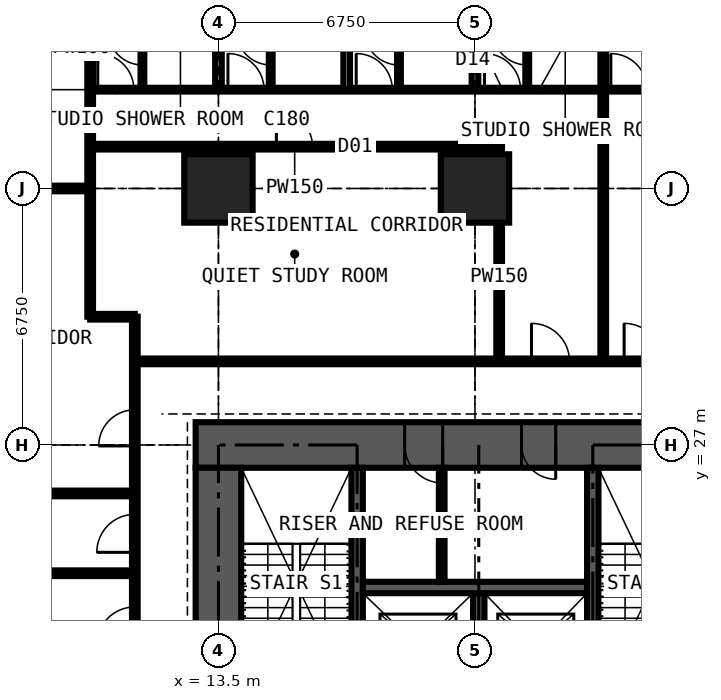
"""IFC4 building model, lengths in metres.
Left out: names, types, materials, properties, quantities, classifications, styles, units other than length and angle.
Written with IfcOpenShell. Run it as: python <this file> out.ifc"""

import sys

from ifc_helpers import new_model, si_unit, direction, frame, frame_2d, origin, origin_2d, place, context, subcontext, project, spatial, rectangle, extrude, element, fill, save


model = new_model("IFC4")
c1 = context("Model", 3, precision=1e-05, world=origin(), true_north=direction((0.0, 1.0)))
c2 = subcontext(c1, "Body", "Model", "MODEL_VIEW")
j1 = project(units=[si_unit("LENGTHUNIT", "METRE"), si_unit("PLANEANGLEUNIT", "RADIAN")], contexts=[c1])
p1 = place(None, origin())
s1 = spatial("IfcSite", under=j1, at=p1, CompositionType="ELEMENT")
p2 = place(p1, origin())
s2 = spatial("IfcBuilding", under=s1, at=p2, CompositionType="ELEMENT")
p3 = place(p2, frame((0.0, 0.0, 57.6)))
s3 = spatial("IfcBuildingStorey", under=s2, at=p3, CompositionType="ELEMENT", Elevation=57.6)
for number, where, z_axis, x_axis in (
    (1, (13.5, 33.75, 0.0), (0.0, 0.0, 1.0), (1.0, 0.0, 0.0)),
    (2, (20.25, 33.75, 0.0), (0.0, 0.0, 1.0), (1.0, 0.0, 0.0)),
):
    element("IfcColumn", number, at=place(p3, frame(where, z_axis=z_axis, x_axis=x_axis)), inside=s3, PredefinedType="COLUMN", context=c2, shape_type="SweptSolid", body=[
        extrude(rectangle(XDim=1.8, YDim=1.8, at=origin_2d()), origin(), (0.0, 0.0, 1.0), 3.6),
    ])
p4 = place(p3, frame((27.6, 27.0, 0.0), z_axis=(0.0, 0.0, 1.0), x_axis=(-1.0, 0.0, 0.0)))
e3 = element("IfcWall", 3, at=p4, inside=s3, PredefinedType="SHEAR", context=c2, shape_type="SweptSolid", body=[
    extrude(rectangle(XDim=14.7, YDim=1.2, at=frame_2d((7.35, 0.0))), origin(), (0.0, 0.0, 1.0), 3.6),
])
p5 = place(p4, frame((5.225, 0.0, 0.0)))
e4 = element("IfcOpeningElement", 4, at=p5, cuts=e3, PredefinedType="OPENING", context=c2, shape_type="SweptSolid", body=[
    extrude(rectangle(XDim=0.9, YDim=2.2, at=frame_2d((0.45, 1.1))), frame((0.0, 0.61, 0.0), z_axis=(0.0, -1.0, 0.0), x_axis=(1.0, 0.0, 0.0)), (0.0, 0.0, 1.0), 1.22),
])
p6 = place(p4, frame((8.2, 0.0, 0.0)))
e5 = element("IfcOpeningElement", 5, at=p6, cuts=e3, PredefinedType="OPENING", context=c2, shape_type="SweptSolid", body=[
    extrude(rectangle(XDim=1.0, YDim=2.2, at=frame_2d((0.5, 1.1))), frame((0.0, 0.61, 0.0), z_axis=(0.0, -1.0, 0.0), x_axis=(1.0, 0.0, 0.0)), (0.0, 0.0, 1.0), 1.22),
])
p7 = place(p3, frame((13.5, 26.4, 0.0), z_axis=(0.0, 0.0, 1.0), x_axis=(0.0, -1.0, 0.0)))
e6 = element("IfcWall", 6, at=p7, inside=s3, PredefinedType="SHEAR", context=c2, shape_type="SweptSolid", body=[
    extrude(rectangle(XDim=12.3, YDim=1.2, at=frame_2d((6.15, 0.0))), origin(), (0.0, 0.0, 1.0), 3.6),
])
p8 = place(p7, frame((7.45, 0.0, 0.0)))
e7 = element("IfcOpeningElement", 7, at=p8, cuts=e6, PredefinedType="OPENING", context=c2, shape_type="SweptSolid", body=[
    extrude(rectangle(XDim=1.2, YDim=2.2, at=frame_2d((0.6, 1.1))), frame((0.0, 0.61, 0.0), z_axis=(0.0, -1.0, 0.0), x_axis=(1.0, 0.0, 0.0)), (0.0, 0.0, 1.0), 1.22),
])
for number, where, z_axis, x_axis in (
    (8, (17.15, 20.3, 0.0), (0.0, 0.0, 1.0), (0.0, 1.0, 0.0)),
    (9, (23.35, 20.3, 0.0), (0.0, 0.0, 1.0), (0.0, 1.0, 0.0)),
):
    element("IfcWall", number, at=place(p3, frame(where, z_axis=z_axis, x_axis=x_axis)), inside=s3, PredefinedType="SHEAR", context=c2, shape_type="SweptSolid", body=[
        extrude(rectangle(XDim=6.1, YDim=0.3, at=frame_2d((3.05, 0.0))), origin(), (0.0, 0.0, 1.0), 3.6),
    ])
p9 = place(p3, frame((20.35, 20.3, 0.0), z_axis=(0.0, 0.0, 1.0), x_axis=(0.0, 1.0, 0.0)))
e10 = element("IfcWall", 10, at=p9, inside=s3, PredefinedType="SHEAR", context=c2, shape_type="SweptSolid", body=[
    extrude(rectangle(XDim=2.8, YDim=0.3, at=frame_2d((1.4, 0.0))), origin(), (0.0, 0.0, 1.0), 3.6),
])
p10 = place(p3, frame((17.3, 23.25, 0.0), z_axis=(0.0, 0.0, 1.0), x_axis=(1.0, 0.0, 0.0)))
e11 = element("IfcWall", 11, at=p10, inside=s3, PredefinedType="SHEAR", context=c2, shape_type="SweptSolid", body=[
    extrude(rectangle(XDim=5.9, YDim=0.3, at=frame_2d((2.95, 0.0))), origin(), (0.0, 0.0, 1.0), 3.6),
])
p11 = place(p3, frame((19.375, 23.4, 0.0), z_axis=(0.0, 0.0, 1.0), x_axis=(0.0, 1.0, 0.0)))
e12 = element("IfcWall", 12, at=p11, inside=s3, PredefinedType="PARTITIONING", context=c2, shape_type="SweptSolid", body=[
    extrude(rectangle(XDim=3.0, YDim=0.15, at=frame_2d((1.5, 0.0))), origin(), (0.0, 0.0, 1.0), 3.375),
])
p12 = place(p3, frame((-0.734, 23.625, 0.0), z_axis=(0.0, 0.0, 1.0), x_axis=(1.0, 0.0, 0.0)))
e13 = element("IfcWall", 13, at=p12, inside=s3, PredefinedType="PARTITIONING", context=c2, shape_type="SweptSolid", body=[
    extrude(rectangle(XDim=12.034, YDim=0.15, at=frame_2d((6.017, 0.0))), origin(), (0.0, 0.0, 1.0), 3.375),
])
p13 = place(p3, frame((4.15, 33.75, 0.0), z_axis=(0.0, 0.0, 1.0), x_axis=(1.0, 0.0, 0.0)))
e14 = element("IfcWall", 14, at=p13, inside=s3, PredefinedType="PARTITIONING", context=c2, shape_type="SweptSolid", body=[
    extrude(rectangle(XDim=5.975, YDim=0.15, at=frame_2d((2.988, 0.0))), origin(), (0.0, 0.0, 1.0), 2.877),
])
p14 = place(p3, frame((5.65, 25.725, 0.0), z_axis=(0.0, 0.0, 1.0), x_axis=(1.0, 0.0, 0.0)))
e15 = element("IfcWall", 15, at=p14, inside=s3, PredefinedType="PARTITIONING", context=c2, shape_type="SweptSolid", body=[
    extrude(rectangle(XDim=5.65, YDim=0.15, at=frame_2d((2.825, 0.0))), origin(), (0.0, 0.0, 1.0), 3.375),
])
p15 = place(p3, frame((10.125, 30.375, 0.0), z_axis=(0.0, 0.0, 1.0), x_axis=(0.0, 1.0, 0.0)))
e16 = element("IfcWall", 16, at=p15, inside=s3, PredefinedType="PARTITIONING", context=c2, shape_type="SweptSolid", body=[
    extrude(rectangle(XDim=10.859, YDim=0.15, at=frame_2d((5.429, 0.0))), origin(), (0.0, 0.0, 1.0), 3.375),
])
p16 = place(p3, frame((10.125, 30.375, 0.0), z_axis=(0.0, 0.0, 1.0), x_axis=(1.0, 0.0, 0.0)))
e17 = element("IfcWall", 17, at=p16, inside=s3, PredefinedType="PARTITIONING", context=c2, shape_type="SweptSolid", body=[
    extrude(rectangle(XDim=1.175, YDim=0.15, at=frame_2d((0.587, 0.0))), origin(), (0.0, 0.0, 1.0), 3.375),
])
p17 = place(p3, frame((10.125, 34.85, 0.0), z_axis=(0.0, 0.0, 1.0), x_axis=(1.0, 0.0, 0.0)))
e18 = element("IfcWall", 18, at=p17, inside=s3, PredefinedType="PARTITIONING", context=c2, shape_type="SweptSolid", body=[
    extrude(rectangle(XDim=10.762, YDim=0.15, at=frame_2d((5.381, 0.0))), origin(), (0.0, 0.0, 1.0), 3.375),
])
p18 = place(p17, frame((4.9, 0.0, 0.0)))
e19 = element("IfcOpeningElement", 19, at=p18, cuts=e18, PredefinedType="OPENING", context=c2, shape_type="SweptSolid", body=[
    extrude(rectangle(XDim=0.95, YDim=2.2, at=frame_2d((0.475, 1.1))), frame((0.0, 0.085, 0.0), z_axis=(0.0, -1.0, 0.0), x_axis=(1.0, 0.0, 0.0)), (0.0, 0.0, 1.0), 0.17),
])
p19 = place(p3, frame((10.125, 36.35, 0.0), z_axis=(0.0, 0.0, 1.0), x_axis=(1.0, 0.0, 0.0)))
e20 = element("IfcWall", 20, at=p19, inside=s3, PredefinedType="PARTITIONING", context=c2, shape_type="SweptSolid", body=[
    extrude(rectangle(XDim=23.625, YDim=0.1, at=frame_2d((11.812, 0.0))), origin(), (0.0, 0.0, 1.0), 3.375),
])
p20 = place(p19, frame((20.5, 0.0, 0.0)))
e21 = element("IfcOpeningElement", 21, at=p20, cuts=e20, PredefinedType="OPENING", context=c2, shape_type="SweptSolid", body=[
    extrude(rectangle(XDim=0.95, YDim=2.2, at=frame_2d((0.475, 1.1))), frame((0.0, 0.06, 0.0), z_axis=(0.0, -1.0, 0.0), x_axis=(1.0, 0.0, 0.0)), (0.0, 0.0, 1.0), 0.12),
])
p21 = place(p19, frame((17.125, 0.0, 0.0)))
e22 = element("IfcOpeningElement", 22, at=p21, cuts=e20, PredefinedType="OPENING", context=c2, shape_type="SweptSolid", body=[
    extrude(rectangle(XDim=0.95, YDim=2.2, at=frame_2d((0.475, 1.1))), frame((0.0, 0.06, 0.0), z_axis=(0.0, -1.0, 0.0), x_axis=(1.0, 0.0, 0.0)), (0.0, 0.0, 1.0), 0.12),
])
p22 = place(p19, frame((13.7, 0.0, 0.0)))
e23 = element("IfcOpeningElement", 23, at=p22, cuts=e20, PredefinedType="OPENING", context=c2, shape_type="SweptSolid", body=[
    extrude(rectangle(XDim=0.95, YDim=2.2, at=frame_2d((0.475, 1.1))), frame((0.0, 0.06, 0.0), z_axis=(0.0, -1.0, 0.0), x_axis=(1.0, 0.0, 0.0)), (0.0, 0.0, 1.0), 0.12),
])
p23 = place(p19, frame((0.2, 0.0, 0.0)))
e24 = element("IfcOpeningElement", 24, at=p23, cuts=e20, PredefinedType="OPENING", context=c2, shape_type="SweptSolid", body=[
    extrude(rectangle(XDim=0.95, YDim=2.2, at=frame_2d((0.475, 1.1))), frame((0.0, 0.06, 0.0), z_axis=(0.0, -1.0, 0.0), x_axis=(1.0, 0.0, 0.0)), (0.0, 0.0, 1.0), 0.12),
])
p24 = place(p19, frame((3.625, 0.0, 0.0)))
e25 = element("IfcOpeningElement", 25, at=p24, cuts=e20, PredefinedType="OPENING", context=c2, shape_type="SweptSolid", body=[
    extrude(rectangle(XDim=0.95, YDim=2.2, at=frame_2d((0.475, 1.1))), frame((0.0, 0.06, 0.0), z_axis=(0.0, -1.0, 0.0), x_axis=(1.0, 0.0, 0.0)), (0.0, 0.0, 1.0), 0.12),
])
p25 = place(p19, frame((7.0, 0.0, 0.0)))
e26 = element("IfcOpeningElement", 26, at=p25, cuts=e20, PredefinedType="OPENING", context=c2, shape_type="SweptSolid", body=[
    extrude(rectangle(XDim=0.95, YDim=2.2, at=frame_2d((0.475, 1.1))), frame((0.0, 0.06, 0.0), z_axis=(0.0, -1.0, 0.0), x_axis=(1.0, 0.0, 0.0)), (0.0, 0.0, 1.0), 0.12),
])
p26 = place(p19, frame((10.375, 0.0, 0.0)))
e27 = element("IfcOpeningElement", 27, at=p26, cuts=e20, PredefinedType="OPENING", context=c2, shape_type="SweptSolid", body=[
    extrude(rectangle(XDim=0.95, YDim=2.2, at=frame_2d((0.475, 1.1))), frame((0.0, 0.06, 0.0), z_axis=(0.0, -1.0, 0.0), x_axis=(1.0, 0.0, 0.0)), (0.0, 0.0, 1.0), 0.12),
])
p27 = place(p3, frame((11.3, 11.3, 0.0), z_axis=(0.0, 0.0, 1.0), x_axis=(0.0, 1.0, 0.0)))
e28 = element("IfcWall", 28, at=p27, inside=s3, PredefinedType="PARTITIONING", context=c2, shape_type="SweptSolid", body=[
    extrude(rectangle(XDim=19.075, YDim=0.15, at=frame_2d((9.538, 0.0))), origin(), (0.0, 0.0, 1.0), 3.375),
])
p28 = place(p27, frame((12.875, 0.0, 0.0)))
e29 = element("IfcOpeningElement", 29, at=p28, cuts=e28, PredefinedType="OPENING", context=c2, shape_type="SweptSolid", body=[
    extrude(rectangle(XDim=1.0, YDim=2.2, at=frame_2d((0.5, 1.1))), frame((0.0, 0.085, 0.0), z_axis=(0.0, -1.0, 0.0), x_axis=(1.0, 0.0, 0.0)), (0.0, 0.0, 1.0), 0.17),
])
p29 = place(p27, frame((10.438, 0.0, 0.0)))
e30 = element("IfcOpeningElement", 30, at=p29, cuts=e28, PredefinedType="OPENING", context=c2, shape_type="SweptSolid", body=[
    extrude(rectangle(XDim=1.0, YDim=2.2, at=frame_2d((0.5, 1.1))), frame((0.0, 0.085, 0.0), z_axis=(0.0, -1.0, 0.0), x_axis=(1.0, 0.0, 0.0)), (0.0, 0.0, 1.0), 0.17),
])
p30 = place(p27, frame((15.675, 0.0, 0.0)))
e31 = element("IfcOpeningElement", 31, at=p30, cuts=e28, PredefinedType="OPENING", context=c2, shape_type="SweptSolid", body=[
    extrude(rectangle(XDim=0.95, YDim=2.2, at=frame_2d((0.475, 1.1))), frame((0.0, 0.085, 0.0), z_axis=(0.0, -1.0, 0.0), x_axis=(1.0, 0.0, 0.0)), (0.0, 0.0, 1.0), 0.17),
])
p31 = place(p3, frame((11.3, 29.2, 0.0), z_axis=(0.0, 0.0, 1.0), x_axis=(1.0, 0.0, 0.0)))
e32 = element("IfcWall", 32, at=p31, inside=s3, PredefinedType="PARTITIONING", context=c2, shape_type="SweptSolid", body=[
    extrude(rectangle(XDim=19.075, YDim=0.15, at=frame_2d((9.538, 0.0))), origin(), (0.0, 0.0, 1.0), 3.375),
])
p32 = place(p31, frame((12.875, 0.0, 0.0)))
e33 = element("IfcOpeningElement", 33, at=p32, cuts=e32, PredefinedType="OPENING", context=c2, shape_type="SweptSolid", body=[
    extrude(rectangle(XDim=1.0, YDim=2.2, at=frame_2d((0.5, 1.1))), frame((0.0, 0.085, 0.0), z_axis=(0.0, -1.0, 0.0), x_axis=(1.0, 0.0, 0.0)), (0.0, 0.0, 1.0), 0.17),
])
p33 = place(p31, frame((10.438, 0.0, 0.0)))
e34 = element("IfcOpeningElement", 34, at=p33, cuts=e32, PredefinedType="OPENING", context=c2, shape_type="SweptSolid", body=[
    extrude(rectangle(XDim=1.0, YDim=2.2, at=frame_2d((0.5, 1.1))), frame((0.0, 0.085, 0.0), z_axis=(0.0, -1.0, 0.0), x_axis=(1.0, 0.0, 0.0)), (0.0, 0.0, 1.0), 0.17),
])
p34 = place(p31, frame((15.675, 0.0, 0.0)))
e35 = element("IfcOpeningElement", 35, at=p34, cuts=e32, PredefinedType="OPENING", context=c2, shape_type="SweptSolid", body=[
    extrude(rectangle(XDim=0.95, YDim=2.2, at=frame_2d((0.475, 1.1))), frame((0.0, 0.085, 0.0), z_axis=(0.0, -1.0, 0.0), x_axis=(1.0, 0.0, 0.0)), (0.0, 0.0, 1.0), 0.17),
])
p35 = place(p3, frame((11.5, 36.35, 0.0), z_axis=(0.0, 0.0, 1.0), x_axis=(0.0, 1.0, 0.0)))
e36 = element("IfcWall", 36, at=p35, inside=s3, PredefinedType="PARTITIONING", context=c2, shape_type="SweptSolid", body=[
    extrude(rectangle(XDim=2.2, YDim=0.1, at=frame_2d((1.1, 0.0))), origin(), (0.0, 0.0, 1.0), 3.375),
])
p36 = place(p35, frame((0.65, 0.0, 0.0)))
e37 = element("IfcOpeningElement", 37, at=p36, cuts=e36, PredefinedType="OPENING", context=c2, shape_type="SweptSolid", body=[
    extrude(rectangle(XDim=0.9, YDim=2.2, at=frame_2d((0.45, 1.1))), frame((0.0, 0.06, 0.0), z_axis=(0.0, -1.0, 0.0), x_axis=(1.0, 0.0, 0.0)), (0.0, 0.0, 1.0), 0.12),
])
p37 = place(p3, frame((13.5, 36.35, 0.0), z_axis=(0.0, 0.0, 1.0), x_axis=(0.0, 1.0, 0.0)))
e38 = element("IfcWall", 38, at=p37, inside=s3, PredefinedType="PARTITIONING", context=c2, shape_type="SweptSolid", body=[
    extrude(rectangle(XDim=4.884, YDim=0.175, at=frame_2d((2.442, 0.0))), origin(), (0.0, 0.0, 1.0), 2.61),
])
p38 = place(p3, frame((14.875, 36.35, 0.0), z_axis=(0.0, 0.0, 1.0), x_axis=(0.0, 1.0, 0.0)))
e39 = element("IfcWall", 39, at=p38, inside=s3, PredefinedType="PARTITIONING", context=c2, shape_type="SweptSolid", body=[
    extrude(rectangle(XDim=2.2, YDim=0.1, at=frame_2d((1.1, 0.0))), origin(), (0.0, 0.0, 1.0), 3.375),
])
p39 = place(p38, frame((0.65, 0.0, 0.0)))
e40 = element("IfcOpeningElement", 40, at=p39, cuts=e39, PredefinedType="OPENING", context=c2, shape_type="SweptSolid", body=[
    extrude(rectangle(XDim=0.9, YDim=2.2, at=frame_2d((0.45, 1.1))), frame((0.0, 0.06, 0.0), z_axis=(0.0, -1.0, 0.0), x_axis=(1.0, 0.0, 0.0)), (0.0, 0.0, 1.0), 0.12),
])
p40 = place(p3, frame((16.875, 36.35, 0.0), z_axis=(0.0, 0.0, 1.0), x_axis=(0.0, 1.0, 0.0)))
e41 = element("IfcWall", 41, at=p40, inside=s3, PredefinedType="PARTITIONING", context=c2, shape_type="SweptSolid", body=[
    extrude(rectangle(XDim=4.884, YDim=0.175, at=frame_2d((2.442, 0.0))), origin(), (0.0, 0.0, 1.0), 3.375),
])
p41 = place(p3, frame((18.25, 36.35, 0.0), z_axis=(0.0, 0.0, 1.0), x_axis=(0.0, 1.0, 0.0)))
e42 = element("IfcWall", 42, at=p41, inside=s3, PredefinedType="PARTITIONING", context=c2, shape_type="SweptSolid", body=[
    extrude(rectangle(XDim=2.2, YDim=0.1, at=frame_2d((1.1, 0.0))), origin(), (0.0, 0.0, 1.0), 3.375),
])
p42 = place(p41, frame((0.65, 0.0, 0.0)))
e43 = element("IfcOpeningElement", 43, at=p42, cuts=e42, PredefinedType="OPENING", context=c2, shape_type="SweptSolid", body=[
    extrude(rectangle(XDim=0.9, YDim=2.2, at=frame_2d((0.45, 1.1))), frame((0.0, 0.06, 0.0), z_axis=(0.0, -1.0, 0.0), x_axis=(1.0, 0.0, 0.0)), (0.0, 0.0, 1.0), 0.12),
])
p43 = place(p3, frame((20.25, 36.35, 0.0), z_axis=(0.0, 0.0, 1.0), x_axis=(0.0, 1.0, 0.0)))
e44 = element("IfcWall", 44, at=p43, inside=s3, PredefinedType="PARTITIONING", context=c2, shape_type="SweptSolid", body=[
    extrude(rectangle(XDim=4.884, YDim=0.175, at=frame_2d((2.442, 0.0))), origin(), (0.0, 0.0, 1.0), 2.61),
])
p44 = place(p3, frame((20.887, 29.2, 0.0), z_axis=(0.0, 0.0, 1.0), x_axis=(0.0, 1.0, 0.0)))
e45 = element("IfcWall", 45, at=p44, inside=s3, PredefinedType="PARTITIONING", context=c2, shape_type="SweptSolid", body=[
    extrude(rectangle(XDim=5.65, YDim=0.15, at=frame_2d((2.825, 0.0))), origin(), (0.0, 0.0, 1.0), 3.375),
])
p45 = place(p3, frame((21.625, 36.35, 0.0), z_axis=(0.0, 0.0, 1.0), x_axis=(0.0, 1.0, 0.0)))
e46 = element("IfcWall", 46, at=p45, inside=s3, PredefinedType="PARTITIONING", context=c2, shape_type="SweptSolid", body=[
    extrude(rectangle(XDim=2.2, YDim=0.1, at=frame_2d((1.1, 0.0))), origin(), (0.0, 0.0, 1.0), 3.375),
])
p46 = place(p45, frame((0.65, 0.0, 0.0)))
e47 = element("IfcOpeningElement", 47, at=p46, cuts=e46, PredefinedType="OPENING", context=c2, shape_type="SweptSolid", body=[
    extrude(rectangle(XDim=0.9, YDim=2.2, at=frame_2d((0.45, 1.1))), frame((0.0, 0.06, 0.0), z_axis=(0.0, -1.0, 0.0), x_axis=(1.0, 0.0, 0.0)), (0.0, 0.0, 1.0), 0.12),
])
p47 = place(p3, frame((23.625, 29.2, 0.0), z_axis=(0.0, 0.0, 1.0), x_axis=(0.0, 1.0, 0.0)))
e48 = element("IfcWall", 48, at=p47, inside=s3, PredefinedType="PARTITIONING", context=c2, shape_type="SweptSolid", body=[
    extrude(rectangle(XDim=12.034, YDim=0.15, at=frame_2d((6.017, 0.0))), origin(), (0.0, 0.0, 1.0), 3.375),
])
p48 = place(p5, origin())
e49 = element("IfcDoor", 49, at=p48, inside=s3, OperationType="SINGLE_SWING_LEFT", PredefinedType="DOOR", context=c2, shape_type="SweptSolid", body=[
    extrude(rectangle(XDim=0.9, YDim=2.2, at=frame_2d((0.45, 1.1))), frame((0.0, 0.4, 0.0), z_axis=(0.0, -1.0, 0.0), x_axis=(1.0, 0.0, 0.0)), (0.0, 0.0, 1.0), 0.8),
])
fill(e4, e49)
p49 = place(p6, origin())
e50 = element("IfcDoor", 50, at=p49, inside=s3, OperationType="SINGLE_SWING_LEFT", PredefinedType="DOOR", context=c2, shape_type="SweptSolid", body=[
    extrude(rectangle(XDim=1.0, YDim=2.2, at=frame_2d((0.5, 1.1))), frame((0.0, 0.025, 0.0), z_axis=(0.0, -1.0, 0.0), x_axis=(1.0, 0.0, 0.0)), (0.0, 0.0, 1.0), 0.05),
])
fill(e5, e50)
p50 = place(p22, origin())
e51 = element("IfcDoor", 51, at=p50, inside=s3, OperationType="SINGLE_SWING_LEFT", PredefinedType="DOOR", context=c2, shape_type="SweptSolid", body=[
    extrude(rectangle(XDim=0.95, YDim=2.2, at=frame_2d((0.475, 1.1))), frame((0.0, 0.025, 0.0), z_axis=(0.0, -1.0, 0.0), x_axis=(1.0, 0.0, 0.0)), (0.0, 0.0, 1.0), 0.05),
])
fill(e23, e51)
p51 = place(p32, origin())
e52 = element("IfcDoor", 52, at=p51, inside=s3, OperationType="SINGLE_SWING_LEFT", PredefinedType="DOOR", context=c2, shape_type="SweptSolid", body=[
    extrude(rectangle(XDim=1.0, YDim=2.2, at=frame_2d((0.5, 1.1))), frame((0.0, 0.025, 0.0), z_axis=(0.0, -1.0, 0.0), x_axis=(1.0, 0.0, 0.0)), (0.0, 0.0, 1.0), 0.05),
])
fill(e33, e52)
p52 = place(p23, origin())
e53 = element("IfcDoor", 53, at=p52, inside=s3, OperationType="SINGLE_SWING_LEFT", PredefinedType="DOOR", context=c2, shape_type="SweptSolid", body=[
    extrude(rectangle(XDim=0.95, YDim=2.2, at=frame_2d((0.475, 1.1))), frame((0.0, 0.025, 0.0), z_axis=(0.0, -1.0, 0.0), x_axis=(1.0, 0.0, 0.0)), (0.0, 0.0, 1.0), 0.05),
])
fill(e24, e53)
p53 = place(p36, origin())
e54 = element("IfcDoor", 54, at=p53, inside=s3, OperationType="SINGLE_SWING_RIGHT", PredefinedType="DOOR", context=c2, shape_type="SweptSolid", body=[
    extrude(rectangle(XDim=0.9, YDim=2.2, at=frame_2d((0.45, 1.1))), frame((0.0, 0.025, 0.0), z_axis=(0.0, -1.0, 0.0), x_axis=(1.0, 0.0, 0.0)), (0.0, 0.0, 1.0), 0.05),
])
fill(e37, e54)
p54 = place(p24, origin())
e55 = element("IfcDoor", 55, at=p54, inside=s3, OperationType="SINGLE_SWING_LEFT", PredefinedType="DOOR", context=c2, shape_type="SweptSolid", body=[
    extrude(rectangle(XDim=0.95, YDim=2.2, at=frame_2d((0.475, 1.1))), frame((0.0, 0.025, 0.0), z_axis=(0.0, -1.0, 0.0), x_axis=(1.0, 0.0, 0.0)), (0.0, 0.0, 1.0), 0.05),
])
fill(e25, e55)
p55 = place(p39, origin())
e56 = element("IfcDoor", 56, at=p55, inside=s3, OperationType="SINGLE_SWING_RIGHT", PredefinedType="DOOR", context=c2, shape_type="SweptSolid", body=[
    extrude(rectangle(XDim=0.9, YDim=2.2, at=frame_2d((0.45, 1.1))), frame((0.0, 0.025, 0.0), z_axis=(0.0, -1.0, 0.0), x_axis=(1.0, 0.0, 0.0)), (0.0, 0.0, 1.0), 0.05),
])
fill(e40, e56)
p56 = place(p25, origin())
e57 = element("IfcDoor", 57, at=p56, inside=s3, OperationType="SINGLE_SWING_LEFT", PredefinedType="DOOR", context=c2, shape_type="SweptSolid", body=[
    extrude(rectangle(XDim=0.95, YDim=2.2, at=frame_2d((0.475, 1.1))), frame((0.0, 0.025, 0.0), z_axis=(0.0, -1.0, 0.0), x_axis=(1.0, 0.0, 0.0)), (0.0, 0.0, 1.0), 0.05),
])
fill(e26, e57)
p57 = place(p42, origin())
e58 = element("IfcDoor", 58, at=p57, inside=s3, OperationType="SINGLE_SWING_RIGHT", PredefinedType="DOOR", context=c2, shape_type="SweptSolid", body=[
    extrude(rectangle(XDim=0.9, YDim=2.2, at=frame_2d((0.45, 1.1))), frame((0.0, 0.025, 0.0), z_axis=(0.0, -1.0, 0.0), x_axis=(1.0, 0.0, 0.0)), (0.0, 0.0, 1.0), 0.05),
])
fill(e43, e58)
p58 = place(p26, origin())
e59 = element("IfcDoor", 59, at=p58, inside=s3, OperationType="SINGLE_SWING_LEFT", PredefinedType="DOOR", context=c2, shape_type="SweptSolid", body=[
    extrude(rectangle(XDim=0.95, YDim=2.2, at=frame_2d((0.475, 1.1))), frame((0.0, 0.025, 0.0), z_axis=(0.0, -1.0, 0.0), x_axis=(1.0, 0.0, 0.0)), (0.0, 0.0, 1.0), 0.05),
])
fill(e27, e59)
p59 = place(p46, origin())
e60 = element("IfcDoor", 60, at=p59, inside=s3, OperationType="SINGLE_SWING_RIGHT", PredefinedType="DOOR", context=c2, shape_type="SweptSolid", body=[
    extrude(rectangle(XDim=0.9, YDim=2.2, at=frame_2d((0.45, 1.1))), frame((0.0, 0.025, 0.0), z_axis=(0.0, -1.0, 0.0), x_axis=(1.0, 0.0, 0.0)), (0.0, 0.0, 1.0), 0.05),
])
fill(e47, e60)
p60 = place(p33, origin())
e61 = element("IfcDoor", 61, at=p60, inside=s3, OperationType="SINGLE_SWING_LEFT", PredefinedType="DOOR", context=c2, shape_type="SweptSolid", body=[
    extrude(rectangle(XDim=1.0, YDim=2.2, at=frame_2d((0.5, 1.1))), frame((0.0, 0.025, 0.0), z_axis=(0.0, -1.0, 0.0), x_axis=(1.0, 0.0, 0.0)), (0.0, 0.0, 1.0), 0.05),
])
fill(e34, e61)
p61 = place(p18, origin())
e62 = element("IfcDoor", 62, at=p61, inside=s3, OperationType="SINGLE_SWING_LEFT", PredefinedType="DOOR", context=c2, shape_type="SweptSolid", body=[
    extrude(rectangle(XDim=0.95, YDim=2.2, at=frame_2d((0.475, 1.1))), frame((0.0, 0.025, 0.0), z_axis=(0.0, -1.0, 0.0), x_axis=(1.0, 0.0, 0.0)), (0.0, 0.0, 1.0), 0.05),
])
fill(e19, e62)
p62 = place(p28, origin())
e63 = element("IfcDoor", 63, at=p62, inside=s3, OperationType="SINGLE_SWING_LEFT", PredefinedType="DOOR", context=c2, shape_type="SweptSolid", body=[
    extrude(rectangle(XDim=1.0, YDim=2.2, at=frame_2d((0.5, 1.1))), frame((0.0, 0.025, 0.0), z_axis=(0.0, -1.0, 0.0), x_axis=(1.0, 0.0, 0.0)), (0.0, 0.0, 1.0), 0.05),
])
fill(e29, e63)
p63 = place(p29, origin())
e64 = element("IfcDoor", 64, at=p63, inside=s3, OperationType="SINGLE_SWING_LEFT", PredefinedType="DOOR", context=c2, shape_type="SweptSolid", body=[
    extrude(rectangle(XDim=1.0, YDim=2.2, at=frame_2d((0.5, 1.1))), frame((0.0, 0.025, 0.0), z_axis=(0.0, -1.0, 0.0), x_axis=(1.0, 0.0, 0.0)), (0.0, 0.0, 1.0), 0.05),
])
fill(e30, e64)
p64 = place(p30, origin())
e65 = element("IfcDoor", 65, at=p64, inside=s3, OperationType="SINGLE_SWING_LEFT", PredefinedType="DOOR", context=c2, shape_type="SweptSolid", body=[
    extrude(rectangle(XDim=0.95, YDim=2.2, at=frame_2d((0.475, 1.1))), frame((0.0, 0.025, 0.0), z_axis=(0.0, -1.0, 0.0), x_axis=(1.0, 0.0, 0.0)), (0.0, 0.0, 1.0), 0.05),
])
fill(e31, e65)
save(model, sys.argv[1])
